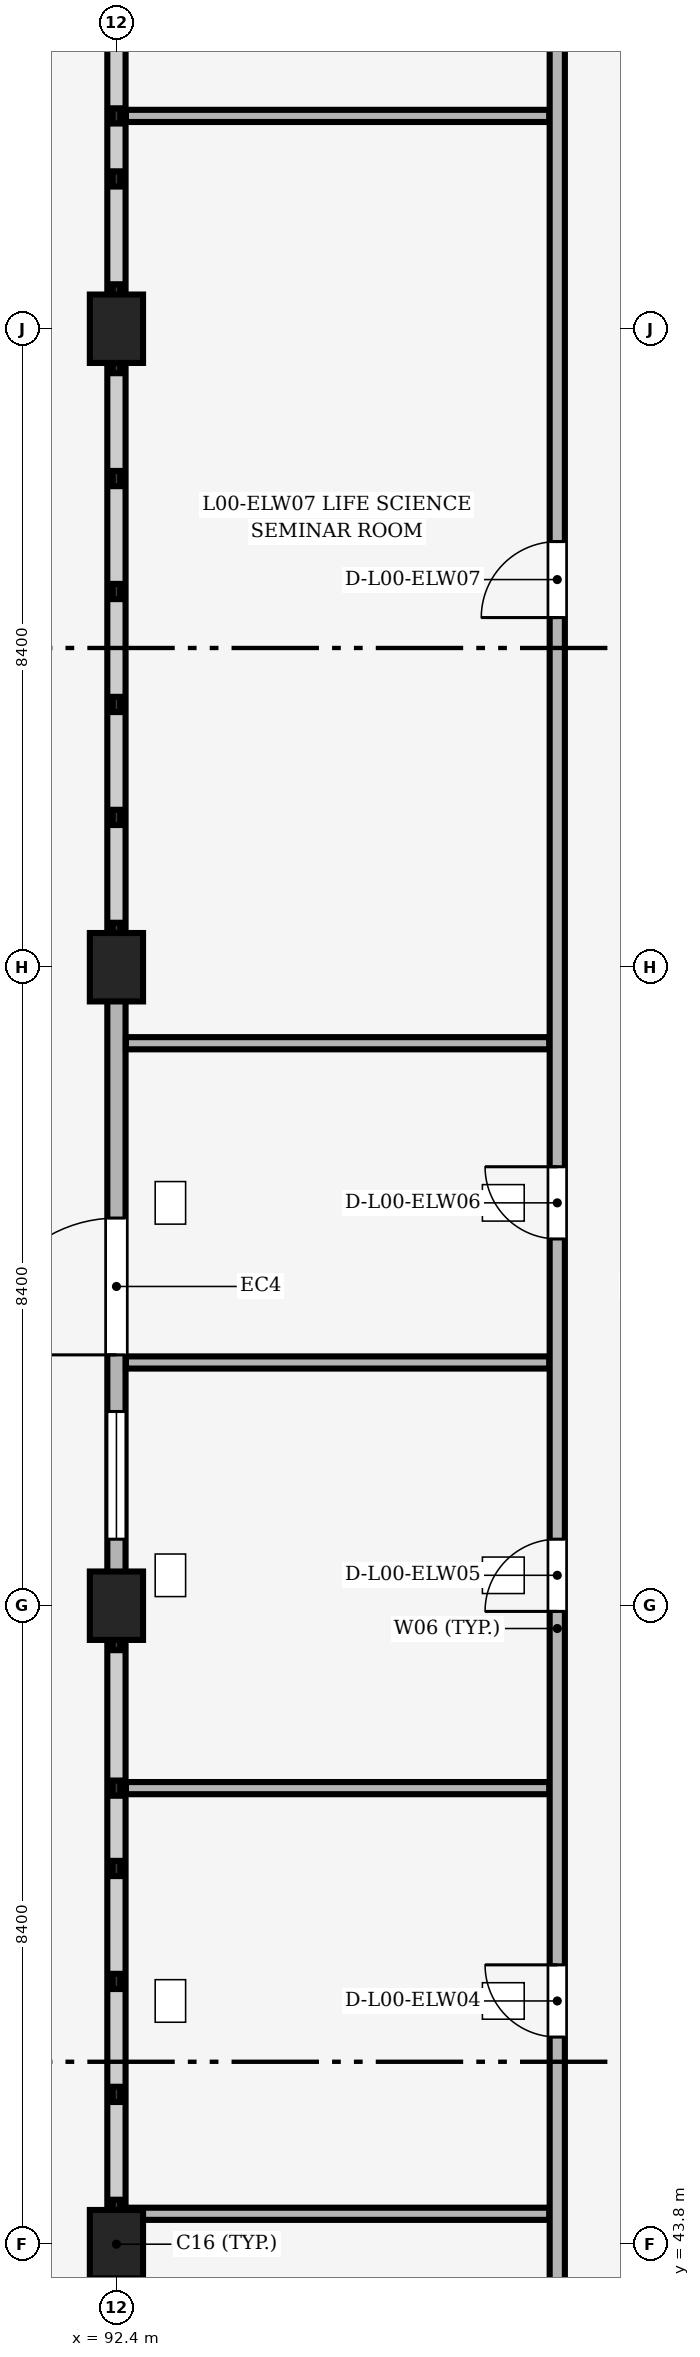
"""IFC4 building model, lengths in metres.
Left out: names, types, materials, properties, quantities, classifications, styles, units other than length and angle.
Written with IfcOpenShell. Run it as: python <this file> out.ifc"""

import sys

from ifc_helpers import new_model, si_unit, direction, frame, frame_2d, origin, origin_2d, place, context, subcontext, project, spatial, rectangle, extrude, element, fill, save


model = new_model("IFC4")
c1 = context("Model", 3, precision=1e-05, world=origin(), true_north=direction((0.0, 1.0)))
c2 = subcontext(c1, "Body", "Model", "MODEL_VIEW")
j1 = project(units=[si_unit("LENGTHUNIT", "METRE"), si_unit("PLANEANGLEUNIT", "RADIAN")], contexts=[c1])
p1 = place(None, origin())
s1 = spatial("IfcSite", under=j1, at=p1, CompositionType="ELEMENT")
p2 = place(p1, origin())
s2 = spatial("IfcBuilding", under=s1, at=p2, CompositionType="ELEMENT")
p3 = place(p2, origin())
s3 = spatial("IfcBuildingStorey", under=s2, at=p3, CompositionType="ELEMENT", Elevation=0.0)
for number, where, z_axis, x_axis in (
    (1, (92.4, 43.8, 0.0), (0.0, 0.0, 1.0), (1.0, 0.0, 0.0)),
    (2, (92.4, 52.2, 0.0), (0.0, 0.0, 1.0), (1.0, 0.0, 0.0)),
    (3, (92.4, 60.6, 0.0), (0.0, 0.0, 1.0), (1.0, 0.0, 0.0)),
    (4, (92.4, 69.0, 0.0), (0.0, 0.0, 1.0), (1.0, 0.0, 0.0)),
):
    element("IfcColumn", number, at=place(p3, frame(where, z_axis=z_axis, x_axis=x_axis)), inside=s3, PredefinedType="COLUMN", context=c2, shape_type="SweptSolid", body=[
        extrude(rectangle(XDim=0.7, YDim=0.9, at=origin_2d()), origin(), (0.0, 0.0, 1.0), 4.8),
    ])
p4 = place(p3, frame((92.4, 35.825, 0.0), z_axis=(0.0, 0.0, 1.0), x_axis=(0.0, 1.0, 0.0)))
e5 = element("IfcWall", 5, at=p4, inside=s3, PredefinedType="SOLIDWALL", context=c2, shape_type="SweptSolid", body=[
    extrude(rectangle(XDim=7.55, YDim=0.24, at=frame_2d((3.775, 0.0))), origin(), (0.0, 0.0, 1.0), 1.15),
])
p5 = place(p3, frame((92.4, 44.225, 0.0), z_axis=(0.0, 0.0, 1.0), x_axis=(0.0, 1.0, 0.0)))
e6 = element("IfcWall", 6, at=p5, inside=s3, PredefinedType="SOLIDWALL", context=c2, shape_type="SweptSolid", body=[
    extrude(rectangle(XDim=7.55, YDim=0.24, at=frame_2d((3.775, 0.0))), origin(), (0.0, 0.0, 1.0), 1.15),
])
p6 = place(p3, frame((92.4, 52.625, 0.0), z_axis=(0.0, 0.0, 1.0), x_axis=(0.0, 1.0, 0.0)))
e7 = element("IfcWall", 7, at=p6, inside=s3, PredefinedType="SOLIDWALL", context=c2, shape_type="SweptSolid", body=[
    extrude(rectangle(XDim=7.55, YDim=0.24, at=frame_2d((3.775, 0.0))), origin(), (0.0, 0.0, 1.0), 3.59),
])
p7 = place(p6, frame((2.875, 0.0, 0.0)))
e8 = element("IfcOpeningElement", 8, at=p7, cuts=e7, PredefinedType="OPENING", context=c2, shape_type="SweptSolid", body=[
    extrude(rectangle(XDim=1.8, YDim=2.35, at=frame_2d((0.9, 1.175))), frame((0.0, 0.13, 0.0), z_axis=(0.0, -1.0, 0.0), x_axis=(1.0, 0.0, 0.0)), (0.0, 0.0, 1.0), 0.26),
])
p8 = place(p6, frame((0.45, 0.0, 0.95)))
e9 = element("IfcOpeningElement", 9, at=p8, cuts=e7, PredefinedType="OPENING", context=c2, shape_type="SweptSolid", body=[
    extrude(rectangle(XDim=1.68, YDim=2.1, at=frame_2d((0.84, 1.05))), frame((0.0, 0.13, 0.0), z_axis=(0.0, -1.0, 0.0), x_axis=(1.0, 0.0, 0.0)), (0.0, 0.0, 1.0), 0.26),
])
for number, where, z_axis, x_axis in (
    (10, (92.4, 61.025, 0.0), (0.0, 0.0, 1.0), (0.0, 1.0, 0.0)),
    (11, (92.4, 69.425, 0.0), (0.0, 0.0, 1.0), (0.0, 1.0, 0.0)),
):
    element("IfcWall", number, at=place(p3, frame(where, z_axis=z_axis, x_axis=x_axis)), inside=s3, PredefinedType="SOLIDWALL", context=c2, shape_type="SweptSolid", body=[
        extrude(rectangle(XDim=7.55, YDim=0.24, at=frame_2d((3.775, 0.0))), origin(), (0.0, 0.0, 1.0), 1.15),
    ])
p9 = place(p3, frame((92.525, 44.2, 0.0), z_axis=(0.0, 0.0, 1.0), x_axis=(1.0, 0.0, 0.0)))
e12 = element("IfcWall", 12, at=p9, inside=s3, PredefinedType="PARTITIONING", context=c2, shape_type="SweptSolid", body=[
    extrude(rectangle(XDim=5.57, YDim=0.16, at=frame_2d((2.785, 0.0))), origin(), (0.0, 0.0, 1.0), 4.5),
])
for number, where, z_axis, x_axis in (
    (13, (92.525, 49.8, 0.0), (0.0, 0.0, 1.0), (1.0, 0.0, 0.0)),
    (14, (92.525, 55.4, 0.0), (0.0, 0.0, 1.0), (1.0, 0.0, 0.0)),
):
    element("IfcWall", number, at=place(p3, frame(where, z_axis=z_axis, x_axis=x_axis)), inside=s3, PredefinedType="PARTITIONING", context=c2, shape_type="SweptSolid", body=[
        extrude(rectangle(XDim=5.57, YDim=0.16, at=frame_2d((2.785, 0.0))), origin(), (0.0, 0.0, 1.0), 4.06),
    ])
p10 = place(p3, frame((92.525, 59.6, 0.0), z_axis=(0.0, 0.0, 1.0), x_axis=(1.0, 0.0, 0.0)))
e15 = element("IfcWall", 15, at=p10, inside=s3, PredefinedType="PARTITIONING", context=c2, shape_type="SweptSolid", body=[
    extrude(rectangle(XDim=5.57, YDim=0.16, at=frame_2d((2.785, 0.0))), origin(), (0.0, 0.0, 1.0), 4.5),
])
p11 = place(p3, frame((92.525, 71.8, 0.0), z_axis=(0.0, 0.0, 1.0), x_axis=(1.0, 0.0, 0.0)))
e16 = element("IfcWall", 16, at=p11, inside=s3, PredefinedType="PARTITIONING", context=c2, shape_type="SweptSolid", body=[
    extrude(rectangle(XDim=5.57, YDim=0.16, at=frame_2d((2.785, 0.0))), origin(), (0.0, 0.0, 1.0), 4.06),
])
p12 = place(p3, frame((98.2, 18.01, 0.0), z_axis=(0.0, 0.0, 1.0), x_axis=(0.0, 1.0, 0.0)))
e17 = element("IfcWall", 17, at=p12, inside=s3, PredefinedType="PARTITIONING", context=c2, shape_type="SweptSolid", body=[
    extrude(rectangle(XDim=67.78, YDim=0.2, at=frame_2d((33.89, 0.0))), origin(), (0.0, 0.0, 1.0), 4.5),
])
p13 = place(p12, frame((3.24, 0.0, 0.0)))
e18 = element("IfcOpeningElement", 18, at=p13, cuts=e17, PredefinedType="OPENING", context=c2, shape_type="SweptSolid", body=[
    extrude(rectangle(XDim=1.7, YDim=2.25, at=frame_2d((0.85, 1.125))), frame((0.0, 0.11, 0.0), z_axis=(0.0, -1.0, 0.0), x_axis=(1.0, 0.0, 0.0)), (0.0, 0.0, 1.0), 0.22),
])
p14 = place(p12, frame((12.965, 0.0, 0.0)))
e19 = element("IfcOpeningElement", 19, at=p14, cuts=e17, PredefinedType="OPENING", context=c2, shape_type="SweptSolid", body=[
    extrude(rectangle(XDim=1.05, YDim=2.2, at=frame_2d((0.525, 1.1))), frame((0.0, 0.11, 0.0), z_axis=(0.0, -1.0, 0.0), x_axis=(1.0, 0.0, 0.0)), (0.0, 0.0, 1.0), 0.22),
])
p15 = place(p12, frame((21.94, 0.0, 0.0)))
e20 = element("IfcOpeningElement", 20, at=p15, cuts=e17, PredefinedType="OPENING", context=c2, shape_type="SweptSolid", body=[
    extrude(rectangle(XDim=1.1, YDim=2.15, at=frame_2d((0.55, 1.075))), frame((0.0, 0.11, 0.0), z_axis=(0.0, -1.0, 0.0), x_axis=(1.0, 0.0, 0.0)), (0.0, 0.0, 1.0), 0.22),
])
p16 = place(p12, frame((28.515, 0.0, 0.0)))
e21 = element("IfcOpeningElement", 21, at=p16, cuts=e17, PredefinedType="OPENING", context=c2, shape_type="SweptSolid", body=[
    extrude(rectangle(XDim=0.95, YDim=2.2, at=frame_2d((0.475, 1.1))), frame((0.0, 0.11, 0.0), z_axis=(0.0, -1.0, 0.0), x_axis=(1.0, 0.0, 0.0)), (0.0, 0.0, 1.0), 0.22),
])
p17 = place(p12, frame((34.115, 0.0, 0.0)))
e22 = element("IfcOpeningElement", 22, at=p17, cuts=e17, PredefinedType="OPENING", context=c2, shape_type="SweptSolid", body=[
    extrude(rectangle(XDim=0.95, YDim=2.2, at=frame_2d((0.475, 1.1))), frame((0.0, 0.11, 0.0), z_axis=(0.0, -1.0, 0.0), x_axis=(1.0, 0.0, 0.0)), (0.0, 0.0, 1.0), 0.22),
])
p18 = place(p12, frame((39.015, 0.0, 0.0)))
e23 = element("IfcOpeningElement", 23, at=p18, cuts=e17, PredefinedType="OPENING", context=c2, shape_type="SweptSolid", body=[
    extrude(rectangle(XDim=0.95, YDim=2.1, at=frame_2d((0.475, 1.05))), frame((0.0, 0.11, 0.0), z_axis=(0.0, -1.0, 0.0), x_axis=(1.0, 0.0, 0.0)), (0.0, 0.0, 1.0), 0.22),
])
p19 = place(p12, frame((47.19, 0.0, 0.0)))
e24 = element("IfcOpeningElement", 24, at=p19, cuts=e17, PredefinedType="OPENING", context=c2, shape_type="SweptSolid", body=[
    extrude(rectangle(XDim=1.0, YDim=2.25, at=frame_2d((0.5, 1.125))), frame((0.0, 0.11, 0.0), z_axis=(0.0, -1.0, 0.0), x_axis=(1.0, 0.0, 0.0)), (0.0, 0.0, 1.0), 0.22),
])
p20 = place(p12, frame((60.24, 0.0, 0.0)))
e25 = element("IfcOpeningElement", 25, at=p20, cuts=e17, PredefinedType="OPENING", context=c2, shape_type="SweptSolid", body=[
    extrude(rectangle(XDim=1.1, YDim=2.15, at=frame_2d((0.55, 1.075))), frame((0.0, 0.11, 0.0), z_axis=(0.0, -1.0, 0.0), x_axis=(1.0, 0.0, 0.0)), (0.0, 0.0, 1.0), 0.22),
])
p21 = place(p7, origin())
e26 = element("IfcDoor", 26, at=p21, inside=s3, OperationType="DOUBLE_DOOR_SINGLE_SWING", PredefinedType="DOOR", context=c2, shape_type="SweptSolid", body=[
    extrude(rectangle(XDim=1.8, YDim=2.35, at=frame_2d((0.9, 1.175))), frame((0.0, 0.025, 0.0), z_axis=(0.0, -1.0, 0.0), x_axis=(1.0, 0.0, 0.0)), (0.0, 0.0, 1.0), 0.05),
])
fill(e8, e26)
p22 = place(p8, origin())
e27 = element("IfcWindow", 27, at=p22, inside=s3, PartitioningType="SINGLE_PANEL", PredefinedType="WINDOW", context=c2, shape_type="SweptSolid", body=[
    extrude(rectangle(XDim=1.68, YDim=2.1, at=frame_2d((0.84, 1.05))), frame((0.0, 0.03, 0.0), z_axis=(0.0, -1.0, 0.0), x_axis=(1.0, 0.0, 0.0)), (0.0, 0.0, 1.0), 0.06),
])
fill(e9, e27)
p23 = place(p16, origin())
e28 = element("IfcDoor", 28, at=p23, inside=s3, OperationType="SINGLE_SWING_RIGHT", PredefinedType="DOOR", context=c2, shape_type="SweptSolid", body=[
    extrude(rectangle(XDim=0.95, YDim=2.2, at=frame_2d((0.475, 1.1))), frame((0.0, 0.025, 0.0), z_axis=(0.0, -1.0, 0.0), x_axis=(1.0, 0.0, 0.0)), (0.0, 0.0, 1.0), 0.05),
])
fill(e21, e28)
p24 = place(p17, origin())
e29 = element("IfcDoor", 29, at=p24, inside=s3, OperationType="SINGLE_SWING_LEFT", PredefinedType="DOOR", context=c2, shape_type="SweptSolid", body=[
    extrude(rectangle(XDim=0.95, YDim=2.2, at=frame_2d((0.475, 1.1))), frame((0.0, 0.025, 0.0), z_axis=(0.0, -1.0, 0.0), x_axis=(1.0, 0.0, 0.0)), (0.0, 0.0, 1.0), 0.05),
])
fill(e22, e29)
p25 = place(p18, origin())
e30 = element("IfcDoor", 30, at=p25, inside=s3, OperationType="SINGLE_SWING_RIGHT", PredefinedType="DOOR", context=c2, shape_type="SweptSolid", body=[
    extrude(rectangle(XDim=0.95, YDim=2.1, at=frame_2d((0.475, 1.05))), frame((0.0, 0.025, 0.0), z_axis=(0.0, -1.0, 0.0), x_axis=(1.0, 0.0, 0.0)), (0.0, 0.0, 1.0), 0.05),
])
fill(e23, e30)
p26 = place(p19, origin())
e31 = element("IfcDoor", 31, at=p26, inside=s3, OperationType="SINGLE_SWING_LEFT", PredefinedType="DOOR", context=c2, shape_type="SweptSolid", body=[
    extrude(rectangle(XDim=1.0, YDim=2.25, at=frame_2d((0.5, 1.125))), frame((0.0, 0.025, 0.0), z_axis=(0.0, -1.0, 0.0), x_axis=(1.0, 0.0, 0.0)), (0.0, 0.0, 1.0), 0.05),
])
fill(e24, e31)
save(model, sys.argv[1])
